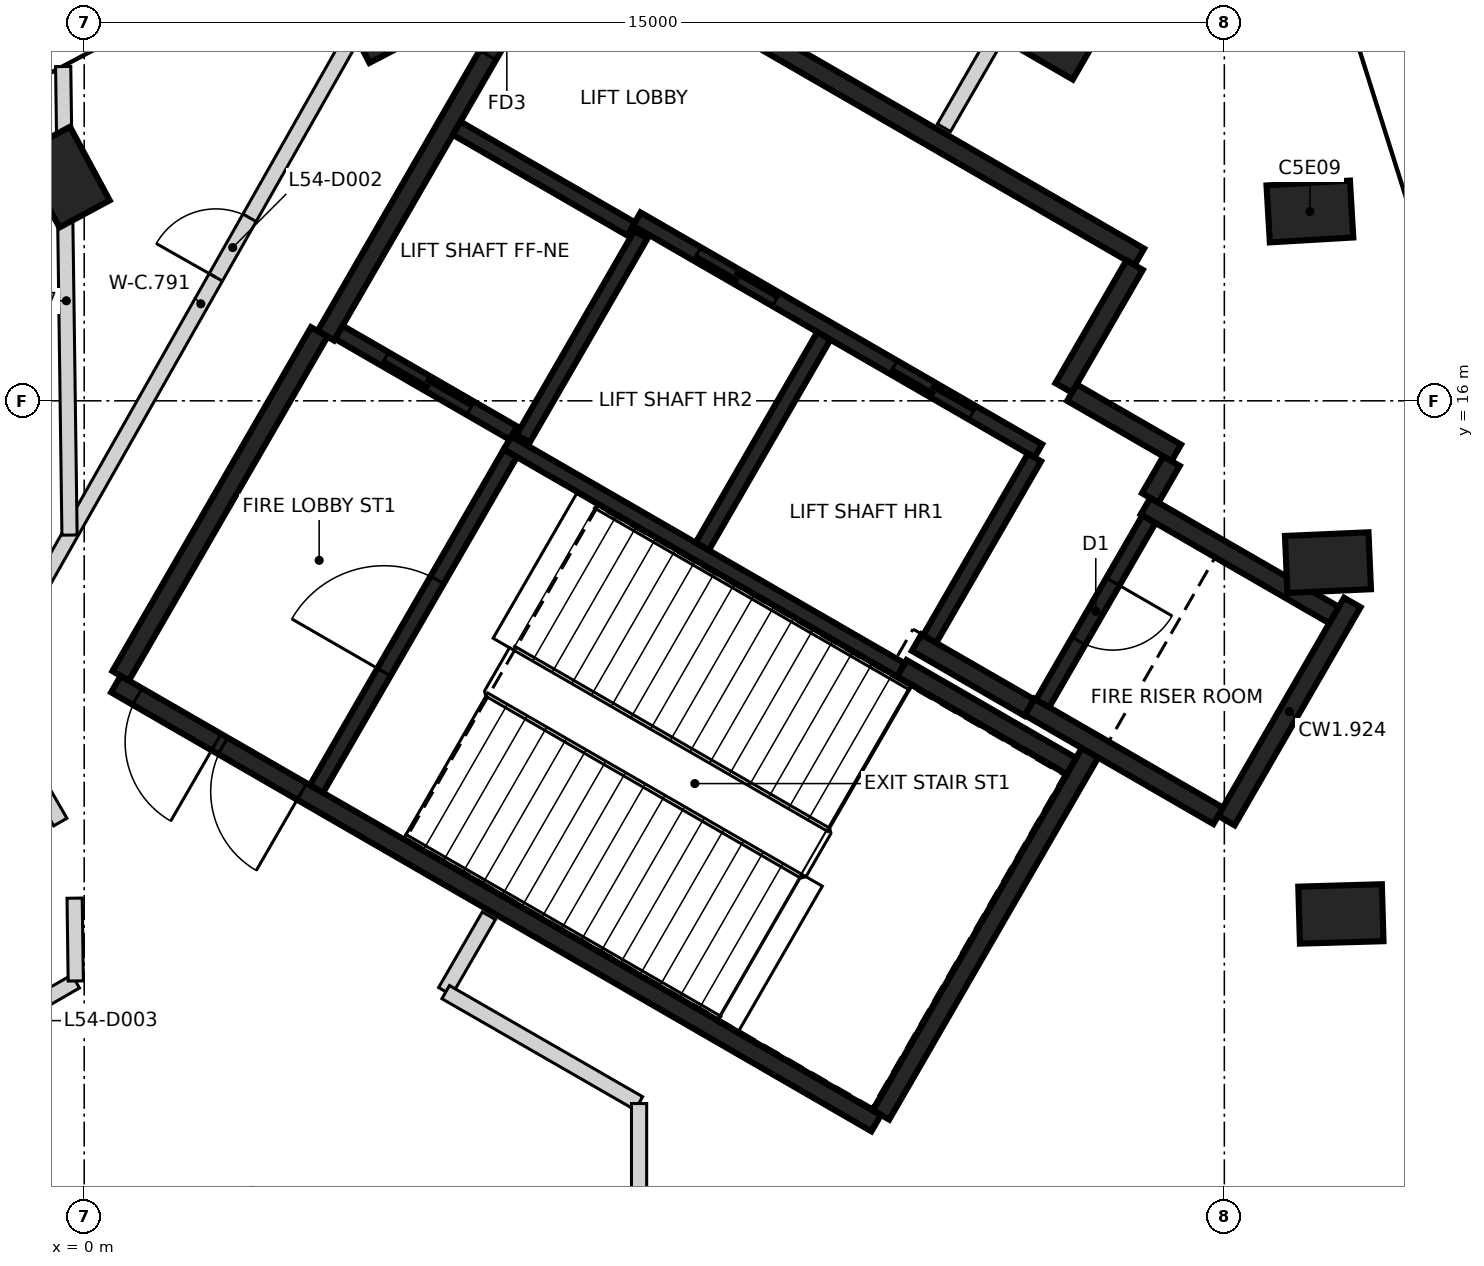
"""IFC4 building model, lengths in metres.
Left out: names, types, materials, properties, quantities, classifications, styles, units other than length and angle.
Written with IfcOpenShell. Run it as: python <this file> out.ifc"""

import sys

from ifc_helpers import new_model, si_unit, direction, frame, frame_2d, origin, origin_2d, place, context, subcontext, project, spatial, rectangle, extrude, element, fill, save


model = new_model("IFC4")
c1 = context("Model", 3, precision=1e-05, world=origin(), true_north=direction((0.0, 1.0)))
c2 = subcontext(c1, "Body", "Model", "MODEL_VIEW")
j1 = project(units=[si_unit("LENGTHUNIT", "METRE"), si_unit("PLANEANGLEUNIT", "RADIAN")], contexts=[c1])
p1 = place(None, origin())
s1 = spatial("IfcSite", under=j1, at=p1, CompositionType="ELEMENT")
p2 = place(p1, origin())
s2 = spatial("IfcBuilding", under=s1, at=p2, CompositionType="ELEMENT")
p3 = place(p2, frame((0.0, 0.0, 216.4)))
s3 = spatial("IfcBuildingStorey", under=s2, at=p3, CompositionType="ELEMENT", Elevation=216.4)
for number, where, z_axis, x_axis in (
    (1, (16.533, 9.25, -0.35), (0.0, 0.0, 1.0), (1.0, 0.029, 0.0)),
    (2, (16.363, 13.872, -0.35), (0.0, 0.0, 1.0), (0.999, 0.044, 0.0)),
    (3, (16.125, 18.491, -0.35), (0.0, 0.0, 1.0), (0.998, 0.058, 0.0)),
    (4, (3.832, 21.107, -0.35), (0.0, 0.0, 1.0), (-0.461, 0.887, 0.0)),
    (5, (-0.256, 18.943, -0.35), (0.0, 0.0, 1.0), (-0.475, 0.88, 0.0)),
):
    element("IfcColumn", number, at=place(p3, frame(where, z_axis=z_axis, x_axis=x_axis)), inside=s3, PredefinedType="COLUMN", context=c2, shape_type="SweptSolid", body=[
        extrude(rectangle(XDim=1.1, YDim=0.75, at=origin_2d()), origin(), (0.0, 0.0, 1.0), 5.0),
    ])
p4 = place(p3, frame((12.71, 22.015, -0.35), z_axis=(0.0, 0.0, 1.0), x_axis=(0.5, 0.866025403784, 0.0)))
e6 = element("IfcColumn", 6, at=p4, inside=s3, PredefinedType="COLUMN", context=c2, shape_type="SweptSolid", body=[
    extrude(rectangle(XDim=2.8, YDim=2.3, at=origin_2d()), origin(), (0.0, 0.0, 1.0), 5.0),
])
p5 = place(p3, frame((10.42, 6.498, 0.0), z_axis=(0.0, 0.0, 1.0), x_axis=(-0.866021906294, 0.500006057782, 0.0)))
e7 = element("IfcWall", 7, at=p5, inside=s3, PredefinedType="SHEAR", context=c2, shape_type="SweptSolid", body=[
    extrude(rectangle(XDim=11.55, YDim=0.25, at=frame_2d((5.775, 0.0))), origin(), (0.0, 0.0, 1.0), 4.65),
])
p6 = place(p5, frame((10.025, 0.0, 0.0)))
e8 = element("IfcOpeningElement", 8, at=p6, cuts=e7, PredefinedType="OPENING", context=c2, shape_type="SweptSolid", body=[
    extrude(rectangle(XDim=1.2, YDim=2.1, at=frame_2d((0.6, 1.05))), frame((0.0, 0.135, 0.0), z_axis=(0.0, -1.0, 0.0), x_axis=(1.0, 0.0, 0.0)), (0.0, 0.0, 1.0), 0.27),
])
p7 = place(p5, frame((8.725, 0.0, 0.0)))
e9 = element("IfcOpeningElement", 9, at=p7, cuts=e7, PredefinedType="OPENING", context=c2, shape_type="SweptSolid", body=[
    extrude(rectangle(XDim=1.2, YDim=2.1, at=frame_2d((0.6, 1.05))), frame((0.0, 0.135, 0.0), z_axis=(0.0, -1.0, 0.0), x_axis=(1.0, 0.0, 0.0)), (0.0, 0.0, 1.0), 0.27),
])
p8 = place(p3, frame((6.304, 22.269, 0.0), z_axis=(0.0, 0.0, 1.0), x_axis=(0.866022959057, -0.500004234368, 0.0)))
e10 = element("IfcWall", 10, at=p8, inside=s3, PredefinedType="SHEAR", context=c2, shape_type="SweptSolid", body=[
    extrude(rectangle(XDim=8.75, YDim=0.25, at=frame_2d((4.375, 0.0))), origin(), (0.0, 0.0, 1.0), 4.65),
])
p9 = place(p3, frame((3.179, 16.856, 0.0), z_axis=(0.0, 0.0, 1.0), x_axis=(0.500001955336, 0.866024274868, 0.0)))
e11 = element("IfcWall", 11, at=p9, inside=s3, PredefinedType="SHEAR", context=c2, shape_type="SweptSolid", body=[
    extrude(rectangle(XDim=6.125, YDim=0.25, at=frame_2d((3.062, 0.0))), origin(), (0.0, 0.0, 1.0), 4.65),
])
p10 = place(p9, frame((4.263, 0.0, 0.0)))
e12 = element("IfcOpeningElement", 12, at=p10, cuts=e11, PredefinedType="OPENING", context=c2, shape_type="SweptSolid", body=[
    extrude(rectangle(XDim=1.0, YDim=2.1, at=frame_2d((0.5, 1.05))), frame((0.0, 0.135, 0.0), z_axis=(0.0, -1.0, 0.0), x_axis=(1.0, 0.0, 0.0)), (0.0, 0.0, 1.0), 0.27),
])
p11 = place(p3, frame((0.48, 12.381, 0.0), z_axis=(0.0, 0.0, 1.0), x_axis=(0.49999885962, 0.866026062182, 0.0)))
e13 = element("IfcWall", 13, at=p11, inside=s3, PredefinedType="SHEAR", context=c2, shape_type="SweptSolid", body=[
    extrude(rectangle(XDim=5.225, YDim=0.25, at=frame_2d((2.612, 0.0))), origin(), (0.0, 0.0, 1.0), 4.65),
])
p12 = place(p3, frame((13.238, 11.378, 0.0), z_axis=(0.0, 0.0, 1.0), x_axis=(-0.500008851346, -0.866020293397, 0.0)))
e14 = element("IfcWall", 14, at=p12, inside=s3, PredefinedType="SHEAR", context=c2, shape_type="SweptSolid", body=[
    extrude(rectangle(XDim=5.51, YDim=0.25, at=frame_2d((2.755, 0.0))), origin(), (0.0, 0.0, 1.0), 4.65),
])
p13 = place(p3, frame((16.684, 13.347, 0.0), z_axis=(0.0, 0.0, 1.0), x_axis=(-0.499998874531, -0.866026053573, 0.0)))
e15 = element("IfcWall", 15, at=p13, inside=s3, PredefinedType="SHEAR", context=c2, shape_type="SweptSolid", body=[
    extrude(rectangle(XDim=3.313, YDim=0.25, at=frame_2d((1.656, 0.0))), origin(), (0.0, 0.0, 1.0), 4.65),
])
p14 = place(p3, frame((14.918, 10.54, 0.0), z_axis=(0.0, 0.0, 1.0), x_axis=(-0.866063538972, 0.499933942099, 0.0)))
e16 = element("IfcWall", 16, at=p14, inside=s3, PredefinedType="SHEAR", context=c2, shape_type="SweptSolid", body=[
    extrude(rectangle(XDim=2.865, YDim=0.25, at=frame_2d((1.432, 0.0))), origin(), (0.0, 0.0, 1.0), 4.65),
])
p15 = place(p3, frame((13.963, 14.614, 0.0), z_axis=(0.0, 0.0, 1.0), x_axis=(0.866042235819, -0.499970844928, 0.0)))
e17 = element("IfcWall", 17, at=p15, inside=s3, PredefinedType="SHEAR", context=c2, shape_type="SweptSolid", body=[
    extrude(rectangle(XDim=2.865, YDim=0.25, at=frame_2d((1.432, 0.0))), origin(), (0.0, 0.0, 1.0), 4.65),
])
p16 = place(p3, frame((10.757, 12.481, 0.0), z_axis=(0.0, 0.0, 1.0), x_axis=(0.866022940537, -0.500004266446, 0.0)))
e18 = element("IfcWall", 18, at=p16, inside=s3, PredefinedType="SHEAR", context=c2, shape_type="SweptSolid", body=[
    extrude(rectangle(XDim=2.575, YDim=0.25, at=frame_2d((1.287, 0.0))), origin(), (0.0, 0.0, 1.0), 4.65),
])
p17 = place(p3, frame((13.819, 17.785, 0.0), z_axis=(0.0, 0.0, 1.0), x_axis=(-0.500039802285, -0.866002422705, 0.0)))
e19 = element("IfcWall", 19, at=p17, inside=s3, PredefinedType="SHEAR", context=c2, shape_type="SweptSolid", body=[
    extrude(rectangle(XDim=1.865, YDim=0.25, at=frame_2d((0.932, 0.0))), origin(), (0.0, 0.0, 1.0), 4.65),
])
p18 = place(p3, frame((12.433, 11.964, 0.0), z_axis=(0.0, 0.0, 1.0), x_axis=(-0.866038183914, 0.499977863513, 0.0)))
e20 = element("IfcWall", 20, at=p18, inside=s3, PredefinedType="SHEAR", context=c2, shape_type="SweptSolid", body=[
    extrude(rectangle(XDim=1.71, YDim=0.25, at=frame_2d((0.855, 0.0))), origin(), (0.0, 0.0, 1.0), 4.65),
])
p19 = place(p3, frame((12.995, 16.108, 0.0), z_axis=(0.0, 0.0, 1.0), x_axis=(0.866044474677, -0.49996696679, 0.0)))
e21 = element("IfcWall", 21, at=p19, inside=s3, PredefinedType="SHEAR", context=c2, shape_type="SweptSolid", body=[
    extrude(rectangle(XDim=1.584, YDim=0.25, at=frame_2d((0.792, 0.0))), origin(), (0.0, 0.0, 1.0), 4.65),
])
p20 = place(p3, frame((14.305, 15.207, 0.0), z_axis=(0.0, 0.0, 1.0), x_axis=(-0.499848422343, -0.866112899501, 0.0)))
e22 = element("IfcWall", 22, at=p20, inside=s3, PredefinedType="SHEAR", context=c2, shape_type="SweptSolid", body=[
    extrude(rectangle(XDim=0.559, YDim=0.25, at=frame_2d((0.28, 0.0))), origin(), (0.0, 0.0, 1.0), 4.65),
])
p21 = place(p3, frame((12.552, 15.342, 0.0), z_axis=(0.0, 0.0, 1.0), x_axis=(-0.866030299012, 0.499991521122, 0.0)))
e23 = element("IfcWall", 23, at=p21, inside=s3, PredefinedType="SHEAR", context=c2, shape_type="SweptSolid", body=[
    extrude(rectangle(XDim=6.1, YDim=0.2, at=frame_2d((3.05, 0.0))), origin(), (0.0, 0.0, 1.0), 4.65),
])
p22 = place(p21, frame((1.0, 0.0, 0.0)))
e24 = element("IfcOpeningElement", 24, at=p22, cuts=e23, PredefinedType="OPENING", context=c2, shape_type="SweptSolid", body=[
    extrude(rectangle(XDim=1.2, YDim=2.1, at=frame_2d((0.6, 1.05))), frame((0.0, 0.11, 0.0), z_axis=(0.0, -1.0, 0.0), x_axis=(1.0, 0.0, 0.0)), (0.0, 0.0, 1.0), 0.22),
])
p23 = place(p21, frame((3.982, 0.0, 0.0)))
e25 = element("IfcOpeningElement", 25, at=p23, cuts=e23, PredefinedType="OPENING", context=c2, shape_type="SweptSolid", body=[
    extrude(rectangle(XDim=1.2, YDim=2.1, at=frame_2d((0.6, 1.05))), frame((0.0, 0.11, 0.0), z_axis=(0.0, -1.0, 0.0), x_axis=(1.0, 0.0, 0.0)), (0.0, 0.0, 1.0), 0.22),
])
p24 = place(p3, frame((10.743, 12.46, 0.0), z_axis=(0.0, 0.0, 1.0), x_axis=(-0.866018848283, 0.500011354289, 0.0)))
e26 = element("IfcWall", 26, at=p24, inside=s3, PredefinedType="SHEAR", context=c2, shape_type="SweptSolid", body=[
    extrude(rectangle(XDim=5.974, YDim=0.2, at=frame_2d((2.987, 0.0))), origin(), (0.0, 0.0, 1.0), 4.65),
])
p25 = place(p3, frame((3.057, 10.895, 0.0), z_axis=(0.0, 0.0, 1.0), x_axis=(0.500027839223, 0.866009330205, 0.0)))
e27 = element("IfcWall", 27, at=p25, inside=s3, PredefinedType="SHEAR", context=c2, shape_type="SweptSolid", body=[
    extrude(rectangle(XDim=5.098, YDim=0.2, at=frame_2d((2.549, 0.0))), origin(), (0.0, 0.0, 1.0), 4.65),
])
p26 = place(p25, frame((1.774, 0.0, 0.0)))
e28 = element("IfcOpeningElement", 28, at=p26, cuts=e27, PredefinedType="OPENING", context=c2, shape_type="SweptSolid", body=[
    extrude(rectangle(XDim=1.4, YDim=2.1, at=frame_2d((0.7, 1.05))), frame((0.0, 0.11, 0.0), z_axis=(0.0, -1.0, 0.0), x_axis=(1.0, 0.0, 0.0)), (0.0, 0.0, 1.0), 0.22),
])
p27 = place(p3, frame((8.132, 14.084, 0.0), z_axis=(0.0, 0.0, 1.0), x_axis=(0.500030834389, 0.86600760081, 0.0)))
e29 = element("IfcWall", 29, at=p27, inside=s3, PredefinedType="SHEAR", context=c2, shape_type="SweptSolid", body=[
    extrude(rectangle(XDim=3.198, YDim=0.2, at=frame_2d((1.599, 0.0))), origin(), (0.0, 0.0, 1.0), 4.65),
])
p28 = place(p3, frame((14.008, 14.442, 0.0), z_axis=(0.0, 0.0, 1.0), x_axis=(-0.499986818241, -0.866033014143, 0.0)))
e30 = element("IfcWall", 30, at=p28, inside=s3, PredefinedType="SHEAR", context=c2, shape_type="SweptSolid", body=[
    extrude(rectangle(XDim=2.798, YDim=0.2, at=frame_2d((1.399, 0.0))), origin(), (0.0, 0.0, 1.0), 4.65),
])
p29 = place(p28, frame((0.949, 0.0, 0.0)))
e31 = element("IfcOpeningElement", 31, at=p29, cuts=e30, PredefinedType="OPENING", context=c2, shape_type="SweptSolid", body=[
    extrude(rectangle(XDim=0.9, YDim=2.1, at=frame_2d((0.45, 1.05))), frame((0.0, 0.11, 0.0), z_axis=(0.0, -1.0, 0.0), x_axis=(1.0, 0.0, 0.0)), (0.0, 0.0, 1.0), 0.22),
])
p30 = place(p3, frame((12.502, 15.255, 0.0), z_axis=(0.0, 0.0, 1.0), x_axis=(-0.499965018551, -0.866045599391, 0.0)))
e32 = element("IfcWall", 32, at=p30, inside=s3, PredefinedType="SHEAR", context=c2, shape_type="SweptSolid", body=[
    extrude(rectangle(XDim=2.759, YDim=0.2, at=frame_2d((1.379, 0.0))), origin(), (0.0, 0.0, 1.0), 4.65),
])
p31 = place(p3, frame((7.324, 18.187, 0.0), z_axis=(0.0, 0.0, 1.0), x_axis=(-0.499967891604, -0.866043940782, 0.0)))
e33 = element("IfcWall", 33, at=p31, inside=s3, PredefinedType="SHEAR", context=c2, shape_type="SweptSolid", body=[
    extrude(rectangle(XDim=3.1, YDim=0.2, at=frame_2d((1.55, 0.0))), origin(), (0.0, 0.0, 1.0), 4.65),
])
p32 = place(p3, frame((5.646, 15.576, 0.0), z_axis=(0.0, 0.0, 1.0), x_axis=(-0.866018407898, 0.500012117035, 0.0)))
e34 = element("IfcWall", 34, at=p32, inside=s3, PredefinedType="SHEAR", context=c2, shape_type="SweptSolid", body=[
    extrude(rectangle(XDim=2.651, YDim=0.2, at=frame_2d((1.325, 0.0))), origin(), (0.0, 0.0, 1.0), 4.65),
])
p33 = place(p32, frame((0.652, 0.0, 0.0)))
e35 = element("IfcOpeningElement", 35, at=p33, cuts=e34, PredefinedType="OPENING", context=c2, shape_type="SweptSolid", body=[
    extrude(rectangle(XDim=1.3, YDim=2.1, at=frame_2d((0.65, 1.05))), frame((0.0, 0.11, 0.0), z_axis=(0.0, -1.0, 0.0), x_axis=(1.0, 0.0, 0.0)), (0.0, 0.0, 1.0), 0.22),
])
p34 = place(p3, frame((7.196, 18.26, 0.0), z_axis=(0.0, 0.0, 1.0), x_axis=(-0.866018407898, 0.500012117035, 0.0)))
e36 = element("IfcWall", 36, at=p34, inside=s3, PredefinedType="SHEAR", context=c2, shape_type="SweptSolid", body=[
    extrude(rectangle(XDim=2.651, YDim=0.2, at=frame_2d((1.325, 0.0))), origin(), (0.0, 0.0, 1.0), 4.65),
])
p35 = place(p3, frame((-9.012, 3.228, 0.0), z_axis=(0.0, 0.0, 1.0), x_axis=(0.866203386391, 0.499691598294, 0.0)))
e37 = element("IfcWall", 37, at=p35, inside=s3, PredefinedType="PARTITIONING", context=c2, shape_type="SweptSolid", body=[
    extrude(rectangle(XDim=10.275, YDim=0.2, at=frame_2d((5.137, 0.0))), origin(), (0.0, 0.0, 1.0), 4.65),
])
p36 = place(p35, frame((8.742, 0.0, 0.0)))
e38 = element("IfcOpeningElement", 38, at=p36, cuts=e37, PredefinedType="OPENING", context=c2, shape_type="SweptSolid", body=[
    extrude(rectangle(XDim=1.0, YDim=2.1, at=frame_2d((0.5, 1.05))), frame((0.0, 0.11, 0.0), z_axis=(0.0, -1.0, 0.0), x_axis=(1.0, 0.0, 0.0)), (0.0, 0.0, 1.0), 0.22),
])
p37 = place(p35, frame((5.69, 0.0, 0.0)))
e39 = element("IfcOpeningElement", 39, at=p37, cuts=e37, PredefinedType="OPENING", context=c2, shape_type="SweptSolid", body=[
    extrude(rectangle(XDim=1.0, YDim=2.1, at=frame_2d((0.5, 1.05))), frame((0.0, 0.11, 0.0), z_axis=(0.0, -1.0, 0.0), x_axis=(1.0, 0.0, 0.0)), (0.0, 0.0, 1.0), 0.22),
])
p38 = place(p35, frame((1.585, 0.0, 0.0)))
e40 = element("IfcOpeningElement", 40, at=p38, cuts=e37, PredefinedType="OPENING", context=c2, shape_type="SweptSolid", body=[
    extrude(rectangle(XDim=1.0, YDim=2.1, at=frame_2d((0.5, 1.05))), frame((0.0, 0.11, 0.0), z_axis=(0.0, -1.0, 0.0), x_axis=(1.0, 0.0, 0.0)), (0.0, 0.0, 1.0), 0.22),
])
p39 = place(p3, frame((-1.036, 12.743, 0.0), z_axis=(0.0, 0.0, 1.0), x_axis=(0.49314672747, 0.869946150739, 0.0)))
e41 = element("IfcWall", 41, at=p39, inside=s3, PredefinedType="PARTITIONING", context=c2, shape_type="SweptSolid", body=[
    extrude(rectangle(XDim=10.423, YDim=0.2, at=frame_2d((5.211, 0.0))), origin(), (0.0, 0.0, 1.0), 3.75),
])
p40 = place(p39, frame((5.612, 0.0, 0.0)))
e42 = element("IfcOpeningElement", 42, at=p40, cuts=e41, PredefinedType="OPENING", context=c2, shape_type="SweptSolid", body=[
    extrude(rectangle(XDim=0.9, YDim=2.1, at=frame_2d((0.45, 1.05))), frame((0.0, 0.11, 0.0), z_axis=(0.0, -1.0, 0.0), x_axis=(1.0, 0.0, 0.0)), (0.0, 0.0, 1.0), 0.22),
])
p41 = place(p3, frame((-1.023, 11.687, 0.0), z_axis=(0.0, 0.0, 1.0), x_axis=(0.499692660748, -0.866202773486, 0.0)))
e43 = element("IfcWall", 43, at=p41, inside=s3, PredefinedType="PARTITIONING", context=c2, shape_type="SweptSolid", body=[
    extrude(rectangle(XDim=1.419, YDim=0.2, at=frame_2d((0.709, 0.0))), origin(), (0.0, 0.0, 1.0), 4.65),
])
p42 = place(p3, frame((-0.126, 9.457, 0.0), z_axis=(0.0, 0.0, 1.0), x_axis=(0.013672785902, -0.999906523094, 0.0)))
e44 = element("IfcWall", 44, at=p42, inside=s3, PredefinedType="PARTITIONING", context=c2, shape_type="SweptSolid", body=[
    extrude(rectangle(XDim=1.089, YDim=0.2, at=frame_2d((0.544, 0.0))), origin(), (0.0, 0.0, 1.0), 4.65),
])
p43 = place(p3, frame((4.749, 8.231, 0.0), z_axis=(0.0, 0.0, 1.0), x_axis=(0.500592486553, 0.865683061176, 0.0)))
e45 = element("IfcWall", 45, at=p43, inside=s3, PredefinedType="PARTITIONING", context=c2, shape_type="SweptSolid", body=[
    extrude(rectangle(XDim=1.149, YDim=0.2, at=frame_2d((0.575, 0.0))), origin(), (0.0, 0.0, 1.0), 4.65),
])
p44 = place(p3, frame((4.756, 8.221, 0.0), z_axis=(0.0, 0.0, 1.0), x_axis=(0.86663991364, -0.498934123994, 0.0)))
e46 = element("IfcWall", 46, at=p44, inside=s3, PredefinedType="PARTITIONING", context=c2, shape_type="SweptSolid", body=[
    extrude(rectangle(XDim=2.932, YDim=0.2, at=frame_2d((1.466, 0.0))), origin(), (0.0, 0.0, 1.0), 4.65),
])
p45 = place(p3, frame((7.3, -4.631, 0.0), z_axis=(0.0, 0.0, 1.0), x_axis=(0.0, 1.0, 0.0)))
e47 = element("IfcWall", 47, at=p45, inside=s3, PredefinedType="PARTITIONING", context=c2, shape_type="SweptSolid", body=[
    extrude(rectangle(XDim=11.386, YDim=0.2, at=frame_2d((5.693, 0.0))), origin(), (0.0, 0.0, 1.0), 4.65),
])
p46 = place(p45, frame((7.502, 0.0, 0.0)))
e48 = element("IfcOpeningElement", 48, at=p46, cuts=e47, PredefinedType="OPENING", context=c2, shape_type="SweptSolid", body=[
    extrude(rectangle(XDim=1.0, YDim=2.1, at=frame_2d((0.5, 1.05))), frame((0.0, 0.11, 0.0), z_axis=(0.0, -1.0, 0.0), x_axis=(1.0, 0.0, 0.0)), (0.0, 0.0, 1.0), 0.22),
])
p47 = place(p3, frame((-0.276, 20.398, 0.0), z_axis=(0.0, 0.0, 1.0), x_axis=(0.013504253847, -0.999908813407, 0.0)))
e49 = element("IfcWall", 49, at=p47, inside=s3, PredefinedType="PARTITIONING", context=c2, shape_type="SweptSolid", body=[
    extrude(rectangle(XDim=6.165, YDim=0.2, at=frame_2d((3.083, 0.0))), origin(), (0.0, 0.0, 1.0), 4.65),
])
p48 = place(p3, frame((11.311, 19.592, 0.0), z_axis=(0.0, 0.0, 1.0), x_axis=(0.500132351176, 0.865948977311, 0.0)))
e50 = element("IfcWall", 50, at=p48, inside=s3, PredefinedType="PARTITIONING", context=c2, shape_type="SweptSolid", body=[
    extrude(rectangle(XDim=5.293, YDim=0.2, at=frame_2d((2.646, 0.0))), origin(), (0.0, 0.0, 1.0), 4.65),
])
p49 = place(p33, origin())
e51 = element("IfcDoor", 51, at=p49, inside=s3, OperationType="SLIDING_TO_RIGHT", PredefinedType="DOOR", context=c2, shape_type="SweptSolid", body=[
    extrude(rectangle(XDim=1.3, YDim=2.1, at=frame_2d((0.65, 1.05))), frame((0.0, 0.025, 0.0), z_axis=(0.0, -1.0, 0.0), x_axis=(1.0, 0.0, 0.0)), (0.0, 0.0, 1.0), 0.05),
])
fill(e35, e51)
p50 = place(p22, origin())
e52 = element("IfcDoor", 52, at=p50, inside=s3, OperationType="DOUBLE_DOOR_SLIDING", PredefinedType="DOOR", context=c2, shape_type="SweptSolid", body=[
    extrude(rectangle(XDim=1.2, YDim=2.1, at=frame_2d((0.6, 1.05))), frame((0.0, 0.025, 0.0), z_axis=(0.0, -1.0, 0.0), x_axis=(1.0, 0.0, 0.0)), (0.0, 0.0, 1.0), 0.05),
])
fill(e24, e52)
p51 = place(p23, origin())
e53 = element("IfcDoor", 53, at=p51, inside=s3, OperationType="DOUBLE_DOOR_SLIDING", PredefinedType="DOOR", context=c2, shape_type="SweptSolid", body=[
    extrude(rectangle(XDim=1.2, YDim=2.1, at=frame_2d((0.6, 1.05))), frame((0.0, 0.025, 0.0), z_axis=(0.0, -1.0, 0.0), x_axis=(1.0, 0.0, 0.0)), (0.0, 0.0, 1.0), 0.05),
])
fill(e25, e53)
p52 = place(p10, origin())
e54 = element("IfcDoor", 54, at=p52, inside=s3, OperationType="SINGLE_SWING_LEFT", PredefinedType="DOOR", context=c2, shape_type="SweptSolid", body=[
    extrude(rectangle(XDim=1.0, YDim=2.1, at=frame_2d((0.5, 1.05))), frame((0.0, 0.025, 0.0), z_axis=(0.0, -1.0, 0.0), x_axis=(1.0, 0.0, 0.0)), (0.0, 0.0, 1.0), 0.05),
])
fill(e12, e54)
p53 = place(p6, origin())
e55 = element("IfcDoor", 55, at=p53, inside=s3, OperationType="SINGLE_SWING_LEFT", PredefinedType="DOOR", context=c2, shape_type="SweptSolid", body=[
    extrude(rectangle(XDim=1.2, YDim=2.1, at=frame_2d((0.6, 1.05))), frame((0.0, 0.025, 0.0), z_axis=(0.0, -1.0, 0.0), x_axis=(1.0, 0.0, 0.0)), (0.0, 0.0, 1.0), 0.05),
])
fill(e8, e55)
p54 = place(p7, origin())
e56 = element("IfcDoor", 56, at=p54, inside=s3, OperationType="SINGLE_SWING_RIGHT", PredefinedType="DOOR", context=c2, shape_type="SweptSolid", body=[
    extrude(rectangle(XDim=1.2, YDim=2.1, at=frame_2d((0.6, 1.05))), frame((0.0, 0.025, 0.0), z_axis=(0.0, -1.0, 0.0), x_axis=(1.0, 0.0, 0.0)), (0.0, 0.0, 1.0), 0.05),
])
fill(e9, e56)
p55 = place(p26, origin())
e57 = element("IfcDoor", 57, at=p55, inside=s3, OperationType="SINGLE_SWING_RIGHT", PredefinedType="DOOR", context=c2, shape_type="SweptSolid", body=[
    extrude(rectangle(XDim=1.4, YDim=2.1, at=frame_2d((0.7, 1.05))), frame((0.0, 0.025, 0.0), z_axis=(0.0, -1.0, 0.0), x_axis=(1.0, 0.0, 0.0)), (0.0, 0.0, 1.0), 0.05),
])
fill(e28, e57)
p56 = place(p29, origin())
e58 = element("IfcDoor", 58, at=p56, inside=s3, OperationType="SINGLE_SWING_LEFT", PredefinedType="DOOR", context=c2, shape_type="SweptSolid", body=[
    extrude(rectangle(XDim=0.9, YDim=2.1, at=frame_2d((0.45, 1.05))), frame((0.0, 0.025, 0.0), z_axis=(0.0, -1.0, 0.0), x_axis=(1.0, 0.0, 0.0)), (0.0, 0.0, 1.0), 0.05),
])
fill(e31, e58)
p57 = place(p40, origin())
e59 = element("IfcDoor", 59, at=p57, inside=s3, OperationType="SINGLE_SWING_LEFT", PredefinedType="DOOR", context=c2, shape_type="SweptSolid", body=[
    extrude(rectangle(XDim=0.9, YDim=2.1, at=frame_2d((0.45, 1.05))), frame((0.0, 0.025, 0.0), z_axis=(0.0, -1.0, 0.0), x_axis=(1.0, 0.0, 0.0)), (0.0, 0.0, 1.0), 0.05),
])
fill(e42, e59)
save(model, sys.argv[1])
